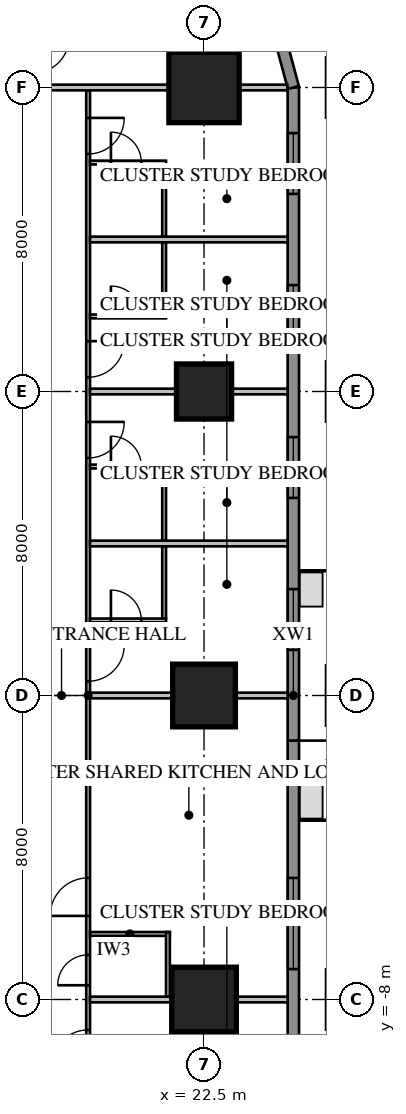
"""IFC4 building model, lengths in metres.
Left out: names, types, materials, properties, quantities, classifications, styles, units other than length and angle.
Written with IfcOpenShell. Run it as: python <this file> out.ifc"""

import sys

from ifc_helpers import new_model, si_unit, direction, frame, frame_2d, origin, origin_2d, place, context, subcontext, project, spatial, rectangle, extrude, element, fill, save


model = new_model("IFC4")
c1 = context("Model", 3, precision=1e-05, world=origin(), true_north=direction((0.0, 1.0)))
c2 = subcontext(c1, "Body", "Model", "MODEL_VIEW")
j1 = project(units=[si_unit("LENGTHUNIT", "METRE"), si_unit("PLANEANGLEUNIT", "RADIAN")], contexts=[c1])
p1 = place(None, origin())
s1 = spatial("IfcSite", under=j1, at=p1, CompositionType="ELEMENT")
p2 = place(p1, origin())
s2 = spatial("IfcBuilding", under=s1, at=p2, CompositionType="ELEMENT")
p3 = place(p2, frame((0.0, 0.0, 31.4)))
s3 = spatial("IfcBuildingStorey", under=s2, at=p3, CompositionType="ELEMENT", Elevation=31.4)
p4 = place(p3, frame((22.5, -8.0, 0.0), z_axis=(0.0, 0.0, 1.0), x_axis=(1.0, 0.0, 0.0)))
e1 = element("IfcColumn", 1, at=p4, inside=s3, PredefinedType="COLUMN", context=c2, shape_type="SweptSolid", body=[
    extrude(rectangle(XDim=1.7, YDim=1.7, at=origin_2d()), origin(), (0.0, 0.0, 1.0), 3.85),
])
p5 = place(p3, frame((22.5, 0.0, 0.0), z_axis=(0.0, 0.0, 1.0), x_axis=(1.0, 0.0, 0.0)))
e2 = element("IfcColumn", 2, at=p5, inside=s3, PredefinedType="COLUMN", context=c2, shape_type="SweptSolid", body=[
    extrude(rectangle(XDim=1.65, YDim=1.65, at=origin_2d()), origin(), (0.0, 0.0, 1.0), 3.85),
])
p6 = place(p3, frame((22.5, 8.0, 0.0), z_axis=(0.0, 0.0, 1.0), x_axis=(1.0, 0.0, 0.0)))
e3 = element("IfcColumn", 3, at=p6, inside=s3, PredefinedType="COLUMN", context=c2, shape_type="SweptSolid", body=[
    extrude(rectangle(XDim=1.45, YDim=1.45, at=origin_2d()), origin(), (0.0, 0.0, 1.0), 3.85),
])
p7 = place(p3, frame((22.5, 16.0, 0.0), z_axis=(0.0, 0.0, 1.0), x_axis=(1.0, 0.0, 0.0)))
e4 = element("IfcColumn", 4, at=p7, inside=s3, PredefinedType="COLUMN", context=c2, shape_type="SweptSolid", body=[
    extrude(rectangle(XDim=1.85, YDim=1.85, at=origin_2d()), origin(), (0.0, 0.0, 1.0), 3.85),
])
p8 = place(p3, frame((24.85, -16.0, 0.0), z_axis=(0.0, 0.0, 1.0), x_axis=(0.0, 1.0, 0.0)))
e5 = element("IfcWall", 5, at=p8, inside=s3, PredefinedType="SOLIDWALL", context=c2, shape_type="SweptSolid", body=[
    extrude(rectangle(XDim=32.0, YDim=0.3, at=frame_2d((16.0, 0.0))), origin(), (0.0, 0.0, 1.0), 3.65),
])
p9 = place(p8, frame((1.2, 0.0, 0.75)))
e6 = element("IfcOpeningElement", 6, at=p9, cuts=e5, PredefinedType="OPENING", context=c2, shape_type="SweptSolid", body=[
    extrude(rectangle(XDim=1.6, YDim=1.8, at=frame_2d((0.8, 0.9))), frame((0.0, 0.17, 0.0), z_axis=(0.0, -1.0, 0.0), x_axis=(1.0, 0.0, 0.0)), (0.0, 0.0, 1.0), 0.34),
])
p10 = place(p8, frame((5.2, 0.0, 0.75)))
e7 = element("IfcOpeningElement", 7, at=p10, cuts=e5, PredefinedType="OPENING", context=c2, shape_type="SweptSolid", body=[
    extrude(rectangle(XDim=1.6, YDim=1.8, at=frame_2d((0.8, 0.9))), frame((0.0, 0.17, 0.0), z_axis=(0.0, -1.0, 0.0), x_axis=(1.0, 0.0, 0.0)), (0.0, 0.0, 1.0), 0.34),
])
p11 = place(p8, frame((17.2, 0.0, 0.75)))
e8 = element("IfcOpeningElement", 8, at=p11, cuts=e5, PredefinedType="OPENING", context=c2, shape_type="SweptSolid", body=[
    extrude(rectangle(XDim=1.6, YDim=1.8, at=frame_2d((0.8, 0.9))), frame((0.0, 0.17, 0.0), z_axis=(0.0, -1.0, 0.0), x_axis=(1.0, 0.0, 0.0)), (0.0, 0.0, 1.0), 0.34),
])
p12 = place(p8, frame((21.2, 0.0, 0.75)))
e9 = element("IfcOpeningElement", 9, at=p12, cuts=e5, PredefinedType="OPENING", context=c2, shape_type="SweptSolid", body=[
    extrude(rectangle(XDim=1.6, YDim=1.8, at=frame_2d((0.8, 0.9))), frame((0.0, 0.17, 0.0), z_axis=(0.0, -1.0, 0.0), x_axis=(1.0, 0.0, 0.0)), (0.0, 0.0, 1.0), 0.34),
])
p13 = place(p8, frame((25.2, 0.0, 0.75)))
e10 = element("IfcOpeningElement", 10, at=p13, cuts=e5, PredefinedType="OPENING", context=c2, shape_type="SweptSolid", body=[
    extrude(rectangle(XDim=1.6, YDim=1.8, at=frame_2d((0.8, 0.9))), frame((0.0, 0.17, 0.0), z_axis=(0.0, -1.0, 0.0), x_axis=(1.0, 0.0, 0.0)), (0.0, 0.0, 1.0), 0.34),
])
p14 = place(p8, frame((29.2, 0.0, 0.75)))
e11 = element("IfcOpeningElement", 11, at=p14, cuts=e5, PredefinedType="OPENING", context=c2, shape_type="SweptSolid", body=[
    extrude(rectangle(XDim=1.6, YDim=1.8, at=frame_2d((0.8, 0.9))), frame((0.0, 0.17, 0.0), z_axis=(0.0, -1.0, 0.0), x_axis=(1.0, 0.0, 0.0)), (0.0, 0.0, 1.0), 0.34),
])
p15 = place(p8, frame((8.8, 0.0, 0.75)))
e12 = element("IfcOpeningElement", 12, at=p15, cuts=e5, PredefinedType="OPENING", context=c2, shape_type="SweptSolid", body=[
    extrude(rectangle(XDim=2.4, YDim=1.8, at=frame_2d((1.2, 0.9))), frame((0.0, 0.17, 0.0), z_axis=(0.0, -1.0, 0.0), x_axis=(1.0, 0.0, 0.0)), (0.0, 0.0, 1.0), 0.34),
])
p16 = place(p8, frame((13.812, 0.0, 0.0)))
e13 = element("IfcOpeningElement", 13, at=p16, cuts=e5, PredefinedType="OPENING", context=c2, shape_type="SweptSolid", body=[
    extrude(rectangle(XDim=1.0, YDim=2.4, at=frame_2d((0.5, 1.2))), frame((0.0, 0.17, 0.0), z_axis=(0.0, -1.0, 0.0), x_axis=(1.0, 0.0, 0.0)), (0.0, 0.0, 1.0), 0.34),
])
p17 = place(p3, frame((24.85, 16.0, 0.0), z_axis=(0.0, 0.0, 1.0), x_axis=(-0.258839972501, 0.965920218567, 0.0)))
e14 = element("IfcWall", 14, at=p17, inside=s3, PredefinedType="SOLIDWALL", context=c2, shape_type="SweptSolid", body=[
    extrude(rectangle(XDim=4.581, YDim=0.3, at=frame_2d((2.291, 0.0))), origin(), (0.0, 0.0, 1.0), 3.65),
])
p18 = place(p3, frame((19.45, -15.925, 0.0), z_axis=(0.0, 0.0, 1.0), x_axis=(0.0, 1.0, 0.0)))
e15 = element("IfcWall", 15, at=p18, inside=s3, PredefinedType="PARTITIONING", context=c2, shape_type="SweptSolid", body=[
    extrude(rectangle(XDim=31.85, YDim=0.1, at=frame_2d((15.925, 0.0))), origin(), (0.0, 0.0, 1.0), 3.65),
])
p19 = place(p18, frame((10.125, 0.0, 0.0)))
e16 = element("IfcOpeningElement", 16, at=p19, cuts=e15, PredefinedType="OPENING", context=c2, shape_type="SweptSolid", body=[
    extrude(rectangle(XDim=1.0, YDim=2.1, at=frame_2d((0.5, 1.05))), frame((0.0, 0.07, 0.0), z_axis=(0.0, -1.0, 0.0), x_axis=(1.0, 0.0, 0.0)), (0.0, 0.0, 1.0), 0.14),
])
p20 = place(p18, frame((8.3, 0.0, 0.0)))
e17 = element("IfcOpeningElement", 17, at=p20, cuts=e15, PredefinedType="OPENING", context=c2, shape_type="SweptSolid", body=[
    extrude(rectangle(XDim=0.8, YDim=2.1, at=frame_2d((0.4, 1.05))), frame((0.0, 0.07, 0.0), z_axis=(0.0, -1.0, 0.0), x_axis=(1.0, 0.0, 0.0)), (0.0, 0.0, 1.0), 0.14),
])
p21 = place(p18, frame((0.3, 0.0, 0.0)))
e18 = element("IfcOpeningElement", 18, at=p21, cuts=e15, PredefinedType="OPENING", context=c2, shape_type="SweptSolid", body=[
    extrude(rectangle(XDim=0.95, YDim=2.1, at=frame_2d((0.475, 1.05))), frame((0.0, 0.07, 0.0), z_axis=(0.0, -1.0, 0.0), x_axis=(1.0, 0.0, 0.0)), (0.0, 0.0, 1.0), 0.14),
])
p22 = place(p18, frame((6.175, 0.0, 0.0)))
e19 = element("IfcOpeningElement", 19, at=p22, cuts=e15, PredefinedType="OPENING", context=c2, shape_type="SweptSolid", body=[
    extrude(rectangle(XDim=0.95, YDim=2.1, at=frame_2d((0.475, 1.05))), frame((0.0, 0.07, 0.0), z_axis=(0.0, -1.0, 0.0), x_axis=(1.0, 0.0, 0.0)), (0.0, 0.0, 1.0), 0.14),
])
p23 = place(p18, frame((16.3, 0.0, 0.0)))
e20 = element("IfcOpeningElement", 20, at=p23, cuts=e15, PredefinedType="OPENING", context=c2, shape_type="SweptSolid", body=[
    extrude(rectangle(XDim=0.95, YDim=2.1, at=frame_2d((0.475, 1.05))), frame((0.0, 0.07, 0.0), z_axis=(0.0, -1.0, 0.0), x_axis=(1.0, 0.0, 0.0)), (0.0, 0.0, 1.0), 0.14),
])
p24 = place(p18, frame((22.175, 0.0, 0.0)))
e21 = element("IfcOpeningElement", 21, at=p24, cuts=e15, PredefinedType="OPENING", context=c2, shape_type="SweptSolid", body=[
    extrude(rectangle(XDim=0.95, YDim=2.1, at=frame_2d((0.475, 1.05))), frame((0.0, 0.07, 0.0), z_axis=(0.0, -1.0, 0.0), x_axis=(1.0, 0.0, 0.0)), (0.0, 0.0, 1.0), 0.14),
])
p25 = place(p18, frame((24.3, 0.0, 0.0)))
e22 = element("IfcOpeningElement", 22, at=p25, cuts=e15, PredefinedType="OPENING", context=c2, shape_type="SweptSolid", body=[
    extrude(rectangle(XDim=0.95, YDim=2.1, at=frame_2d((0.475, 1.05))), frame((0.0, 0.07, 0.0), z_axis=(0.0, -1.0, 0.0), x_axis=(1.0, 0.0, 0.0)), (0.0, 0.0, 1.0), 0.14),
])
p26 = place(p18, frame((30.175, 0.0, 0.0)))
e23 = element("IfcOpeningElement", 23, at=p26, cuts=e15, PredefinedType="OPENING", context=c2, shape_type="SweptSolid", body=[
    extrude(rectangle(XDim=0.95, YDim=2.1, at=frame_2d((0.475, 1.05))), frame((0.0, 0.07, 0.0), z_axis=(0.0, -1.0, 0.0), x_axis=(1.0, 0.0, 0.0)), (0.0, 0.0, 1.0), 0.14),
])
p27 = place(p3, frame((19.5, -6.275, 0.0), z_axis=(0.0, 0.0, 1.0), x_axis=(1.0, 0.0, 0.0)))
e24 = element("IfcWall", 24, at=p27, inside=s3, PredefinedType="PARTITIONING", context=c2, shape_type="SweptSolid", body=[
    extrude(rectangle(XDim=2.1, YDim=0.1, at=frame_2d((1.05, 0.0))), origin(), (0.0, 0.0, 1.0), 3.65),
])
p28 = place(p3, frame((21.55, -7.925, 0.0), z_axis=(0.0, 0.0, 1.0), x_axis=(0.0, 1.0, 0.0)))
e25 = element("IfcWall", 25, at=p28, inside=s3, PredefinedType="PARTITIONING", context=c2, shape_type="SweptSolid", body=[
    extrude(rectangle(XDim=1.7, YDim=0.1, at=frame_2d((0.85, 0.0))), origin(), (0.0, 0.0, 1.0), 3.65),
])
p29 = place(p3, frame((19.5, -8.0, 0.0), z_axis=(0.0, 0.0, 1.0), x_axis=(1.0, 0.0, 0.0)))
e26 = element("IfcWall", 26, at=p29, inside=s3, PredefinedType="PARTITIONING", context=c2, shape_type="SweptSolid", body=[
    extrude(rectangle(XDim=5.2, YDim=0.15, at=frame_2d((2.6, 0.0))), origin(), (0.0, 0.0, 1.0), 3.65),
])
p30 = place(p3, frame((19.5, 0.0, 0.0), z_axis=(0.0, 0.0, 1.0), x_axis=(1.0, 0.0, 0.0)))
e27 = element("IfcWall", 27, at=p30, inside=s3, PredefinedType="PARTITIONING", context=c2, shape_type="SweptSolid", body=[
    extrude(rectangle(XDim=5.2, YDim=0.15, at=frame_2d((2.6, 0.0))), origin(), (0.0, 0.0, 1.0), 2.957),
])
for number, where, z_axis, x_axis in (
    (28, (19.5, 4.0, 0.0), (0.0, 0.0, 1.0), (1.0, 0.0, 0.0)),
    (29, (19.5, 8.0, 0.0), (0.0, 0.0, 1.0), (1.0, 0.0, 0.0)),
    (30, (19.5, 12.0, 0.0), (0.0, 0.0, 1.0), (1.0, 0.0, 0.0)),
):
    element("IfcWall", number, at=place(p3, frame(where, z_axis=z_axis, x_axis=x_axis)), inside=s3, PredefinedType="PARTITIONING", context=c2, shape_type="SweptSolid", body=[
        extrude(rectangle(XDim=5.2, YDim=0.15, at=frame_2d((2.6, 0.0))), origin(), (0.0, 0.0, 1.0), 3.65),
    ])
p31 = place(p3, frame((18.1, 16.0, 0.0), z_axis=(0.0, 0.0, 1.0), x_axis=(1.0, 0.0, 0.0)))
e31 = element("IfcWall", 31, at=p31, inside=s3, PredefinedType="PARTITIONING", context=c2, shape_type="SweptSolid", body=[
    extrude(rectangle(XDim=6.589, YDim=0.15, at=frame_2d((3.295, 0.0))), origin(), (0.0, 0.0, 1.0), 3.65),
])
p32 = place(p3, frame((19.5, 1.975, 0.0), z_axis=(0.0, 0.0, 1.0), x_axis=(1.0, 0.0, 0.0)))
e32 = element("IfcWall", 32, at=p32, inside=s3, PredefinedType="PARTITIONING", context=c2, shape_type="SweptSolid", body=[
    extrude(rectangle(XDim=2.0, YDim=0.1, at=frame_2d((1.0, 0.0))), origin(), (0.0, 0.0, 1.0), 3.65),
])
p33 = place(p32, frame((0.55, 0.0, 0.0)))
e33 = element("IfcOpeningElement", 33, at=p33, cuts=e32, PredefinedType="OPENING", context=c2, shape_type="SweptSolid", body=[
    extrude(rectangle(XDim=0.8, YDim=2.1, at=frame_2d((0.4, 1.05))), frame((0.0, 0.07, 0.0), z_axis=(0.0, -1.0, 0.0), x_axis=(1.0, 0.0, 0.0)), (0.0, 0.0, 1.0), 0.14),
])
p34 = place(p3, frame((21.45, 2.025, 0.0), z_axis=(0.0, 0.0, 1.0), x_axis=(0.0, 1.0, 0.0)))
e34 = element("IfcWall", 34, at=p34, inside=s3, PredefinedType="PARTITIONING", context=c2, shape_type="SweptSolid", body=[
    extrude(rectangle(XDim=1.9, YDim=0.1, at=frame_2d((0.95, 0.0))), origin(), (0.0, 0.0, 1.0), 3.65),
])
p35 = place(p3, frame((19.5, 6.025, 0.0), z_axis=(0.0, 0.0, 1.0), x_axis=(1.0, 0.0, 0.0)))
e35 = element("IfcWall", 35, at=p35, inside=s3, PredefinedType="PARTITIONING", context=c2, shape_type="SweptSolid", body=[
    extrude(rectangle(XDim=2.0, YDim=0.1, at=frame_2d((1.0, 0.0))), origin(), (0.0, 0.0, 1.0), 3.65),
])
p36 = place(p35, frame((0.55, 0.0, 0.0)))
e36 = element("IfcOpeningElement", 36, at=p36, cuts=e35, PredefinedType="OPENING", context=c2, shape_type="SweptSolid", body=[
    extrude(rectangle(XDim=0.8, YDim=2.1, at=frame_2d((0.4, 1.05))), frame((0.0, 0.07, 0.0), z_axis=(0.0, -1.0, 0.0), x_axis=(1.0, 0.0, 0.0)), (0.0, 0.0, 1.0), 0.14),
])
p37 = place(p3, frame((21.45, 4.075, 0.0), z_axis=(0.0, 0.0, 1.0), x_axis=(0.0, 1.0, 0.0)))
e37 = element("IfcWall", 37, at=p37, inside=s3, PredefinedType="PARTITIONING", context=c2, shape_type="SweptSolid", body=[
    extrude(rectangle(XDim=1.9, YDim=0.1, at=frame_2d((0.95, 0.0))), origin(), (0.0, 0.0, 1.0), 3.65),
])
p38 = place(p3, frame((19.5, 9.975, 0.0), z_axis=(0.0, 0.0, 1.0), x_axis=(1.0, 0.0, 0.0)))
e38 = element("IfcWall", 38, at=p38, inside=s3, PredefinedType="PARTITIONING", context=c2, shape_type="SweptSolid", body=[
    extrude(rectangle(XDim=2.0, YDim=0.1, at=frame_2d((1.0, 0.0))), origin(), (0.0, 0.0, 1.0), 3.65),
])
p39 = place(p38, frame((0.55, 0.0, 0.0)))
e39 = element("IfcOpeningElement", 39, at=p39, cuts=e38, PredefinedType="OPENING", context=c2, shape_type="SweptSolid", body=[
    extrude(rectangle(XDim=0.8, YDim=2.1, at=frame_2d((0.4, 1.05))), frame((0.0, 0.07, 0.0), z_axis=(0.0, -1.0, 0.0), x_axis=(1.0, 0.0, 0.0)), (0.0, 0.0, 1.0), 0.14),
])
p40 = place(p3, frame((21.45, 10.025, 0.0), z_axis=(0.0, 0.0, 1.0), x_axis=(0.0, 1.0, 0.0)))
e40 = element("IfcWall", 40, at=p40, inside=s3, PredefinedType="PARTITIONING", context=c2, shape_type="SweptSolid", body=[
    extrude(rectangle(XDim=1.9, YDim=0.1, at=frame_2d((0.95, 0.0))), origin(), (0.0, 0.0, 1.0), 3.65),
])
p41 = place(p3, frame((19.5, 14.025, 0.0), z_axis=(0.0, 0.0, 1.0), x_axis=(1.0, 0.0, 0.0)))
e41 = element("IfcWall", 41, at=p41, inside=s3, PredefinedType="PARTITIONING", context=c2, shape_type="SweptSolid", body=[
    extrude(rectangle(XDim=2.0, YDim=0.1, at=frame_2d((1.0, 0.0))), origin(), (0.0, 0.0, 1.0), 3.65),
])
p42 = place(p41, frame((0.55, 0.0, 0.0)))
e42 = element("IfcOpeningElement", 42, at=p42, cuts=e41, PredefinedType="OPENING", context=c2, shape_type="SweptSolid", body=[
    extrude(rectangle(XDim=0.8, YDim=2.1, at=frame_2d((0.4, 1.05))), frame((0.0, 0.07, 0.0), z_axis=(0.0, -1.0, 0.0), x_axis=(1.0, 0.0, 0.0)), (0.0, 0.0, 1.0), 0.14),
])
p43 = place(p3, frame((21.45, 12.075, 0.0), z_axis=(0.0, 0.0, 1.0), x_axis=(0.0, 1.0, 0.0)))
e43 = element("IfcWall", 43, at=p43, inside=s3, PredefinedType="PARTITIONING", context=c2, shape_type="SweptSolid", body=[
    extrude(rectangle(XDim=1.9, YDim=0.1, at=frame_2d((0.95, 0.0))), origin(), (0.0, 0.0, 1.0), 3.65),
])
p44 = place(p11, origin())
e44 = element("IfcWindow", 44, at=p44, inside=s3, PartitioningType="SINGLE_PANEL", PredefinedType="WINDOW", context=c2, shape_type="SweptSolid", body=[
    extrude(rectangle(XDim=1.6, YDim=1.8, at=frame_2d((0.8, 0.9))), frame((0.0, 0.03, 0.0), z_axis=(0.0, -1.0, 0.0), x_axis=(1.0, 0.0, 0.0)), (0.0, 0.0, 1.0), 0.06),
])
fill(e8, e44)
p45 = place(p12, origin())
e45 = element("IfcWindow", 45, at=p45, inside=s3, PartitioningType="SINGLE_PANEL", PredefinedType="WINDOW", context=c2, shape_type="SweptSolid", body=[
    extrude(rectangle(XDim=1.6, YDim=1.8, at=frame_2d((0.8, 0.9))), frame((0.0, 0.03, 0.0), z_axis=(0.0, -1.0, 0.0), x_axis=(1.0, 0.0, 0.0)), (0.0, 0.0, 1.0), 0.06),
])
fill(e9, e45)
p46 = place(p13, origin())
e46 = element("IfcWindow", 46, at=p46, inside=s3, PartitioningType="SINGLE_PANEL", PredefinedType="WINDOW", context=c2, shape_type="SweptSolid", body=[
    extrude(rectangle(XDim=1.6, YDim=1.8, at=frame_2d((0.8, 0.9))), frame((0.0, 0.03, 0.0), z_axis=(0.0, -1.0, 0.0), x_axis=(1.0, 0.0, 0.0)), (0.0, 0.0, 1.0), 0.06),
])
fill(e10, e46)
p47 = place(p14, origin())
e47 = element("IfcWindow", 47, at=p47, inside=s3, PartitioningType="SINGLE_PANEL", PredefinedType="WINDOW", context=c2, shape_type="SweptSolid", body=[
    extrude(rectangle(XDim=1.6, YDim=1.8, at=frame_2d((0.8, 0.9))), frame((0.0, 0.03, 0.0), z_axis=(0.0, -1.0, 0.0), x_axis=(1.0, 0.0, 0.0)), (0.0, 0.0, 1.0), 0.06),
])
fill(e11, e47)
p48 = place(p15, origin())
e48 = element("IfcWindow", 48, at=p48, inside=s3, PartitioningType="SINGLE_PANEL", PredefinedType="WINDOW", context=c2, shape_type="SweptSolid", body=[
    extrude(rectangle(XDim=2.4, YDim=1.8, at=frame_2d((1.2, 0.9))), frame((0.0, 0.03, 0.0), z_axis=(0.0, -1.0, 0.0), x_axis=(1.0, 0.0, 0.0)), (0.0, 0.0, 1.0), 0.06),
])
fill(e12, e48)
p49 = place(p16, origin())
e49 = element("IfcDoor", 49, at=p49, inside=s3, OperationType="SINGLE_SWING_RIGHT", PredefinedType="DOOR", context=c2, shape_type="SweptSolid", body=[
    extrude(rectangle(XDim=1.0, YDim=2.4, at=frame_2d((0.5, 1.2))), frame((0.0, 0.025, 0.0), z_axis=(0.0, -1.0, 0.0), x_axis=(1.0, 0.0, 0.0)), (0.0, 0.0, 1.0), 0.05),
])
fill(e13, e49)
p50 = place(p19, origin())
e50 = element("IfcDoor", 50, at=p50, inside=s3, OperationType="SINGLE_SWING_LEFT", PredefinedType="DOOR", context=c2, shape_type="SweptSolid", body=[
    extrude(rectangle(XDim=1.0, YDim=2.1, at=frame_2d((0.5, 1.05))), frame((0.0, 0.025, 0.0), z_axis=(0.0, -1.0, 0.0), x_axis=(1.0, 0.0, 0.0)), (0.0, 0.0, 1.0), 0.05),
])
fill(e16, e50)
p51 = place(p20, origin())
e51 = element("IfcDoor", 51, at=p51, inside=s3, OperationType="SINGLE_SWING_LEFT", PredefinedType="DOOR", context=c2, shape_type="SweptSolid", body=[
    extrude(rectangle(XDim=0.8, YDim=2.1, at=frame_2d((0.4, 1.05))), frame((0.0, 0.025, 0.0), z_axis=(0.0, -1.0, 0.0), x_axis=(1.0, 0.0, 0.0)), (0.0, 0.0, 1.0), 0.05),
])
fill(e17, e51)
p52 = place(p22, origin())
e52 = element("IfcDoor", 52, at=p52, inside=s3, OperationType="SINGLE_SWING_LEFT", PredefinedType="DOOR", context=c2, shape_type="SweptSolid", body=[
    extrude(rectangle(XDim=0.95, YDim=2.1, at=frame_2d((0.475, 1.05))), frame((0.0, 0.025, 0.0), z_axis=(0.0, -1.0, 0.0), x_axis=(1.0, 0.0, 0.0)), (0.0, 0.0, 1.0), 0.05),
])
fill(e19, e52)
p53 = place(p23, origin())
e53 = element("IfcDoor", 53, at=p53, inside=s3, OperationType="SINGLE_SWING_RIGHT", PredefinedType="DOOR", context=c2, shape_type="SweptSolid", body=[
    extrude(rectangle(XDim=0.95, YDim=2.1, at=frame_2d((0.475, 1.05))), frame((0.0, 0.025, 0.0), z_axis=(0.0, -1.0, 0.0), x_axis=(1.0, 0.0, 0.0)), (0.0, 0.0, 1.0), 0.05),
])
fill(e20, e53)
p54 = place(p33, origin())
e54 = element("IfcDoor", 54, at=p54, inside=s3, OperationType="SINGLE_SWING_LEFT", PredefinedType="DOOR", context=c2, shape_type="SweptSolid", body=[
    extrude(rectangle(XDim=0.8, YDim=2.1, at=frame_2d((0.4, 1.05))), frame((0.0, 0.025, 0.0), z_axis=(0.0, -1.0, 0.0), x_axis=(1.0, 0.0, 0.0)), (0.0, 0.0, 1.0), 0.05),
])
fill(e33, e54)
p55 = place(p24, origin())
e55 = element("IfcDoor", 55, at=p55, inside=s3, OperationType="SINGLE_SWING_RIGHT", PredefinedType="DOOR", context=c2, shape_type="SweptSolid", body=[
    extrude(rectangle(XDim=0.95, YDim=2.1, at=frame_2d((0.475, 1.05))), frame((0.0, 0.025, 0.0), z_axis=(0.0, -1.0, 0.0), x_axis=(1.0, 0.0, 0.0)), (0.0, 0.0, 1.0), 0.05),
])
fill(e21, e55)
p56 = place(p36, origin())
e56 = element("IfcDoor", 56, at=p56, inside=s3, OperationType="SINGLE_SWING_LEFT", PredefinedType="DOOR", context=c2, shape_type="SweptSolid", body=[
    extrude(rectangle(XDim=0.8, YDim=2.1, at=frame_2d((0.4, 1.05))), frame((0.0, 0.025, 0.0), z_axis=(0.0, -1.0, 0.0), x_axis=(1.0, 0.0, 0.0)), (0.0, 0.0, 1.0), 0.05),
])
fill(e36, e56)
p57 = place(p25, origin())
e57 = element("IfcDoor", 57, at=p57, inside=s3, OperationType="SINGLE_SWING_RIGHT", PredefinedType="DOOR", context=c2, shape_type="SweptSolid", body=[
    extrude(rectangle(XDim=0.95, YDim=2.1, at=frame_2d((0.475, 1.05))), frame((0.0, 0.025, 0.0), z_axis=(0.0, -1.0, 0.0), x_axis=(1.0, 0.0, 0.0)), (0.0, 0.0, 1.0), 0.05),
])
fill(e22, e57)
p58 = place(p39, origin())
e58 = element("IfcDoor", 58, at=p58, inside=s3, OperationType="SINGLE_SWING_LEFT", PredefinedType="DOOR", context=c2, shape_type="SweptSolid", body=[
    extrude(rectangle(XDim=0.8, YDim=2.1, at=frame_2d((0.4, 1.05))), frame((0.0, 0.025, 0.0), z_axis=(0.0, -1.0, 0.0), x_axis=(1.0, 0.0, 0.0)), (0.0, 0.0, 1.0), 0.05),
])
fill(e39, e58)
p59 = place(p26, origin())
e59 = element("IfcDoor", 59, at=p59, inside=s3, OperationType="SINGLE_SWING_RIGHT", PredefinedType="DOOR", context=c2, shape_type="SweptSolid", body=[
    extrude(rectangle(XDim=0.95, YDim=2.1, at=frame_2d((0.475, 1.05))), frame((0.0, 0.025, 0.0), z_axis=(0.0, -1.0, 0.0), x_axis=(1.0, 0.0, 0.0)), (0.0, 0.0, 1.0), 0.05),
])
fill(e23, e59)
p60 = place(p42, origin())
e60 = element("IfcDoor", 60, at=p60, inside=s3, OperationType="SINGLE_SWING_LEFT", PredefinedType="DOOR", context=c2, shape_type="SweptSolid", body=[
    extrude(rectangle(XDim=0.8, YDim=2.1, at=frame_2d((0.4, 1.05))), frame((0.0, 0.025, 0.0), z_axis=(0.0, -1.0, 0.0), x_axis=(1.0, 0.0, 0.0)), (0.0, 0.0, 1.0), 0.05),
])
fill(e42, e60)
save(model, sys.argv[1])
